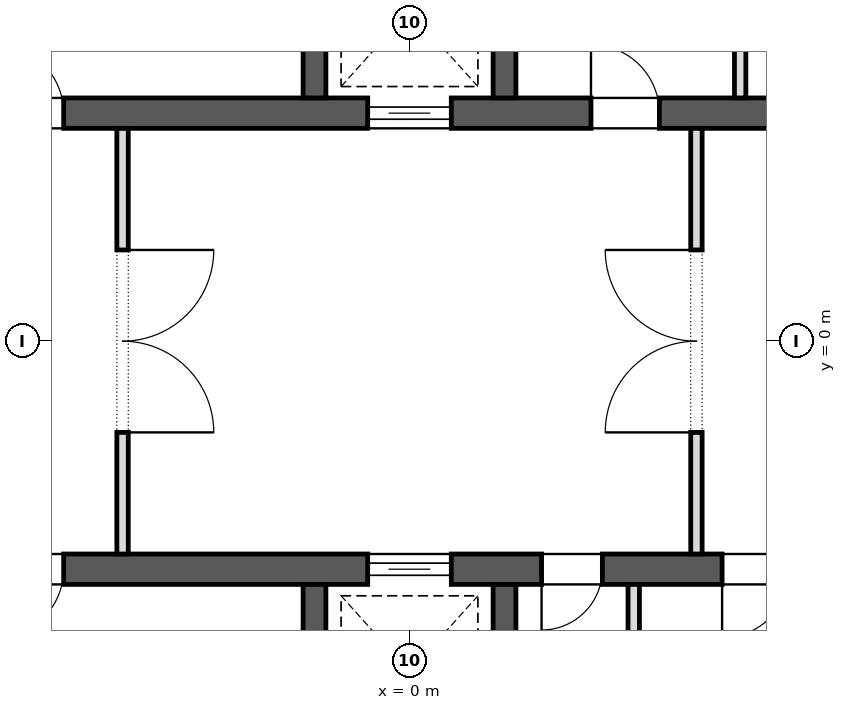
"""IFC4 building model, lengths in metres.
Left out: names, types, materials, properties, quantities, classifications, styles, units other than length and angle.
Written with IfcOpenShell. Run it as: python <this file> out.ifc"""

import sys

from ifc_helpers import new_model, si_unit, direction, frame, frame_2d, origin, place, context, subcontext, project, spatial, rectangle, extrude, element, fill, save


model = new_model("IFC4")
c1 = context("Model", 3, precision=1e-05, world=origin(), true_north=direction((0.0, 1.0)))
c2 = subcontext(c1, "Body", "Model", "MODEL_VIEW")
j1 = project(units=[si_unit("LENGTHUNIT", "METRE"), si_unit("PLANEANGLEUNIT", "RADIAN")], contexts=[c1])
p1 = place(None, origin())
s1 = spatial("IfcSite", under=j1, at=p1, CompositionType="ELEMENT")
p2 = place(p1, origin())
s2 = spatial("IfcBuilding", under=s1, at=p2, CompositionType="ELEMENT")
p3 = place(p2, frame((0.0, 0.0, 343.3)))
s3 = spatial("IfcBuildingStorey", under=s2, at=p3, CompositionType="ELEMENT", Elevation=343.3)
p4 = place(p3, frame((-11.4, 3.0, 0.0), z_axis=(0.0, 0.0, 1.0), x_axis=(1.0, 0.0, 0.0)))
e1 = element("IfcWall", 1, at=p4, inside=s3, PredefinedType="SHEAR", context=c2, shape_type="SweptSolid", body=[
    extrude(rectangle(XDim=22.8, YDim=0.4, at=frame_2d((11.4, 0.0))), origin(), (0.0, 0.0, 1.0), 6.0),
])
p5 = place(p4, frame((10.85, 0.0, 0.0)))
e2 = element("IfcOpeningElement", 2, at=p5, cuts=e1, PredefinedType="OPENING", context=c2, shape_type="SweptSolid", body=[
    extrude(rectangle(XDim=1.1, YDim=2.1, at=frame_2d((0.55, 1.05))), frame((0.0, 0.212, 0.0), z_axis=(0.0, -1.0, 0.0), x_axis=(1.0, 0.0, 0.0)), (0.0, 0.0, 1.0), 0.424),
])
p6 = place(p4, frame((13.788, 0.0, 0.0)))
e3 = element("IfcOpeningElement", 3, at=p6, cuts=e1, PredefinedType="OPENING", context=c2, shape_type="SweptSolid", body=[
    extrude(rectangle(XDim=0.9, YDim=2.1, at=frame_2d((0.45, 1.05))), frame((0.0, 0.212, 0.0), z_axis=(0.0, -1.0, 0.0), x_axis=(1.0, 0.0, 0.0)), (0.0, 0.0, 1.0), 0.424),
])
p7 = place(p4, frame((16.212, 0.0, 0.0)))
e4 = element("IfcOpeningElement", 4, at=p7, cuts=e1, PredefinedType="OPENING", context=c2, shape_type="SweptSolid", body=[
    extrude(rectangle(XDim=0.9, YDim=2.1, at=frame_2d((0.45, 1.05))), frame((0.0, 0.212, 0.0), z_axis=(0.0, -1.0, 0.0), x_axis=(1.0, 0.0, 0.0)), (0.0, 0.0, 1.0), 0.424),
])
p8 = place(p4, frame((5.95, 0.0, 0.0)))
e5 = element("IfcOpeningElement", 5, at=p8, cuts=e1, PredefinedType="OPENING", context=c2, shape_type="SweptSolid", body=[
    extrude(rectangle(XDim=0.9, YDim=2.1, at=frame_2d((0.45, 1.05))), frame((0.0, 0.212, 0.0), z_axis=(0.0, -1.0, 0.0), x_axis=(1.0, 0.0, 0.0)), (0.0, 0.0, 1.0), 0.424),
])
p9 = place(p4, frame((0.637, 0.0, 0.0)))
e6 = element("IfcOpeningElement", 6, at=p9, cuts=e1, PredefinedType="OPENING", context=c2, shape_type="SweptSolid", body=[
    extrude(rectangle(XDim=0.9, YDim=2.1, at=frame_2d((0.45, 1.05))), frame((0.0, 0.212, 0.0), z_axis=(0.0, -1.0, 0.0), x_axis=(1.0, 0.0, 0.0)), (0.0, 0.0, 1.0), 0.424),
])
p10 = place(p4, frame((3.212, 0.0, 0.0)))
e7 = element("IfcOpeningElement", 7, at=p10, cuts=e1, PredefinedType="OPENING", context=c2, shape_type="SweptSolid", body=[
    extrude(rectangle(XDim=0.9, YDim=2.1, at=frame_2d((0.45, 1.05))), frame((0.0, 0.212, 0.0), z_axis=(0.0, -1.0, 0.0), x_axis=(1.0, 0.0, 0.0)), (0.0, 0.0, 1.0), 0.424),
])
for number, where, z_axis, x_axis in (
    (8, (-1.25, 3.2, 0.0), (0.0, 0.0, 1.0), (0.0, 1.0, 0.0)),
    (9, (1.25, 3.2, 0.0), (0.0, 0.0, 1.0), (0.0, 1.0, 0.0)),
):
    element("IfcWall", number, at=place(p3, frame(where, z_axis=z_axis, x_axis=x_axis)), inside=s3, PredefinedType="SHEAR", context=c2, shape_type="SweptSolid", body=[
        extrude(rectangle(XDim=2.9, YDim=0.3, at=frame_2d((1.45, 0.0))), origin(), (0.0, 0.0, 1.0), 6.0),
    ])
p11 = place(p3, frame((-11.4, -3.0, 0.0), z_axis=(0.0, 0.0, 1.0), x_axis=(1.0, 0.0, 0.0)))
e10 = element("IfcWall", 10, at=p11, inside=s3, PredefinedType="SHEAR", context=c2, shape_type="SweptSolid", body=[
    extrude(rectangle(XDim=22.8, YDim=0.4, at=frame_2d((11.4, 0.0))), origin(), (0.0, 0.0, 1.0), 6.0),
])
p12 = place(p11, frame((10.85, 0.0, 0.0)))
e11 = element("IfcOpeningElement", 11, at=p12, cuts=e10, PredefinedType="OPENING", context=c2, shape_type="SweptSolid", body=[
    extrude(rectangle(XDim=1.1, YDim=2.1, at=frame_2d((0.55, 1.05))), frame((0.0, 0.212, 0.0), z_axis=(0.0, -1.0, 0.0), x_axis=(1.0, 0.0, 0.0)), (0.0, 0.0, 1.0), 0.424),
])
p13 = place(p11, frame((13.137, 0.0, 0.0)))
e12 = element("IfcOpeningElement", 12, at=p13, cuts=e10, PredefinedType="OPENING", context=c2, shape_type="SweptSolid", body=[
    extrude(rectangle(XDim=0.8, YDim=2.1, at=frame_2d((0.4, 1.05))), frame((0.0, 0.212, 0.0), z_axis=(0.0, -1.0, 0.0), x_axis=(1.0, 0.0, 0.0)), (0.0, 0.0, 1.0), 0.424),
])
p14 = place(p11, frame((15.512, 0.0, 0.0)))
e13 = element("IfcOpeningElement", 13, at=p14, cuts=e10, PredefinedType="OPENING", context=c2, shape_type="SweptSolid", body=[
    extrude(rectangle(XDim=0.9, YDim=2.1, at=frame_2d((0.45, 1.05))), frame((0.0, 0.212, 0.0), z_axis=(0.0, -1.0, 0.0), x_axis=(1.0, 0.0, 0.0)), (0.0, 0.0, 1.0), 0.424),
])
p15 = place(p11, frame((5.95, 0.0, 0.0)))
e14 = element("IfcOpeningElement", 14, at=p15, cuts=e10, PredefinedType="OPENING", context=c2, shape_type="SweptSolid", body=[
    extrude(rectangle(XDim=0.9, YDim=2.1, at=frame_2d((0.45, 1.05))), frame((0.0, 0.212, 0.0), z_axis=(0.0, -1.0, 0.0), x_axis=(1.0, 0.0, 0.0)), (0.0, 0.0, 1.0), 0.424),
])
p16 = place(p11, frame((1.212, 0.0, 0.0)))
e15 = element("IfcOpeningElement", 15, at=p16, cuts=e10, PredefinedType="OPENING", context=c2, shape_type="SweptSolid", body=[
    extrude(rectangle(XDim=0.9, YDim=2.1, at=frame_2d((0.45, 1.05))), frame((0.0, 0.212, 0.0), z_axis=(0.0, -1.0, 0.0), x_axis=(1.0, 0.0, 0.0)), (0.0, 0.0, 1.0), 0.424),
])
p17 = place(p11, frame((3.788, 0.0, 0.0)))
e16 = element("IfcOpeningElement", 16, at=p17, cuts=e10, PredefinedType="OPENING", context=c2, shape_type="SweptSolid", body=[
    extrude(rectangle(XDim=0.9, YDim=2.1, at=frame_2d((0.45, 1.05))), frame((0.0, 0.212, 0.0), z_axis=(0.0, -1.0, 0.0), x_axis=(1.0, 0.0, 0.0)), (0.0, 0.0, 1.0), 0.424),
])
for number, where, z_axis, x_axis in (
    (17, (-1.25, -6.1, 0.0), (0.0, 0.0, 1.0), (0.0, 1.0, 0.0)),
    (18, (1.25, -6.1, 0.0), (0.0, 0.0, 1.0), (0.0, 1.0, 0.0)),
):
    element("IfcWall", number, at=place(p3, frame(where, z_axis=z_axis, x_axis=x_axis)), inside=s3, PredefinedType="SHEAR", context=c2, shape_type="SweptSolid", body=[
        extrude(rectangle(XDim=2.9, YDim=0.3, at=frame_2d((1.45, 0.0))), origin(), (0.0, 0.0, 1.0), 6.0),
    ])
for number, where, z_axis, x_axis in (
    (19, (4.35, 3.2, 0.0), (0.0, 0.0, 1.0), (0.0, 1.0, 0.0)),
    (20, (2.95, -6.1, 0.0), (0.0, 0.0, 1.0), (0.0, 1.0, 0.0)),
):
    element("IfcWall", number, at=place(p3, frame(where, z_axis=z_axis, x_axis=x_axis)), inside=s3, PredefinedType="PARTITIONING", context=c2, shape_type="SweptSolid", body=[
        extrude(rectangle(XDim=2.9, YDim=0.15, at=frame_2d((1.45, 0.0))), origin(), (0.0, 0.0, 1.0), 5.65),
    ])
p18 = place(p3, frame((-3.775, -2.8, 0.0), z_axis=(0.0, 0.0, 1.0), x_axis=(0.0, 1.0, 0.0)))
e21 = element("IfcWall", 21, at=p18, inside=s3, PredefinedType="PARTITIONING", context=c2, shape_type="SweptSolid", body=[
    extrude(rectangle(XDim=5.6, YDim=0.15, at=frame_2d((2.8, 0.0))), origin(), (0.0, 0.0, 1.0), 5.65),
])
p19 = place(p18, frame((1.6, 0.0, 0.0)))
e22 = element("IfcOpeningElement", 22, at=p19, cuts=e21, PredefinedType="OPENING", context=c2, shape_type="SweptSolid", body=[
    extrude(rectangle(XDim=2.4, YDim=2.1, at=frame_2d((1.2, 1.05))), frame((0.0, 0.087, 0.0), z_axis=(0.0, -1.0, 0.0), x_axis=(1.0, 0.0, 0.0)), (0.0, 0.0, 1.0), 0.174),
])
p20 = place(p3, frame((3.775, -2.8, 0.0), z_axis=(0.0, 0.0, 1.0), x_axis=(0.0, 1.0, 0.0)))
e23 = element("IfcWall", 23, at=p20, inside=s3, PredefinedType="PARTITIONING", context=c2, shape_type="SweptSolid", body=[
    extrude(rectangle(XDim=5.6, YDim=0.15, at=frame_2d((2.8, 0.0))), origin(), (0.0, 0.0, 1.0), 5.65),
])
p21 = place(p20, frame((1.6, 0.0, 0.0)))
e24 = element("IfcOpeningElement", 24, at=p21, cuts=e23, PredefinedType="OPENING", context=c2, shape_type="SweptSolid", body=[
    extrude(rectangle(XDim=2.4, YDim=2.1, at=frame_2d((1.2, 1.05))), frame((0.0, 0.087, 0.0), z_axis=(0.0, -1.0, 0.0), x_axis=(1.0, 0.0, 0.0)), (0.0, 0.0, 1.0), 0.174),
])
p22 = place(p5, origin())
e25 = element("IfcDoor", 25, at=p22, inside=s3, OperationType="SLIDING_TO_LEFT", PredefinedType="DOOR", context=c2, shape_type="SweptSolid", body=[
    extrude(rectangle(XDim=1.1, YDim=2.1, at=frame_2d((0.55, 1.05))), frame((0.0, 0.025, 0.0), z_axis=(0.0, -1.0, 0.0), x_axis=(1.0, 0.0, 0.0)), (0.0, 0.0, 1.0), 0.05),
])
fill(e2, e25)
p23 = place(p12, origin())
e26 = element("IfcDoor", 26, at=p23, inside=s3, OperationType="SLIDING_TO_LEFT", PredefinedType="DOOR", context=c2, shape_type="SweptSolid", body=[
    extrude(rectangle(XDim=1.1, YDim=2.1, at=frame_2d((0.55, 1.05))), frame((0.0, 0.025, 0.0), z_axis=(0.0, -1.0, 0.0), x_axis=(1.0, 0.0, 0.0)), (0.0, 0.0, 1.0), 0.05),
])
fill(e11, e26)
p24 = place(p19, frame((2.4, 0.0, 0.0), z_axis=(0.0, 0.0, 1.0), x_axis=(-1.0, 0.0, 0.0)))
e27 = element("IfcDoor", 27, at=p24, inside=s3, OperationType="DOUBLE_DOOR_SINGLE_SWING", PredefinedType="DOOR", context=c2, shape_type="SweptSolid", body=[
    extrude(rectangle(XDim=2.4, YDim=2.1, at=frame_2d((1.2, 1.05))), frame((0.0, 0.025, 0.0), z_axis=(0.0, -1.0, 0.0), x_axis=(1.0, 0.0, 0.0)), (0.0, 0.0, 1.0), 0.05),
])
fill(e22, e27)
p25 = place(p21, origin())
e28 = element("IfcDoor", 28, at=p25, inside=s3, OperationType="DOUBLE_DOOR_SINGLE_SWING", PredefinedType="DOOR", context=c2, shape_type="SweptSolid", body=[
    extrude(rectangle(XDim=2.4, YDim=2.1, at=frame_2d((1.2, 1.05))), frame((0.0, 0.025, 0.0), z_axis=(0.0, -1.0, 0.0), x_axis=(1.0, 0.0, 0.0)), (0.0, 0.0, 1.0), 0.05),
])
fill(e24, e28)
p26 = place(p6, origin())
e29 = element("IfcDoor", 29, at=p26, inside=s3, OperationType="SINGLE_SWING_RIGHT", PredefinedType="DOOR", context=c2, shape_type="SweptSolid", body=[
    extrude(rectangle(XDim=0.9, YDim=2.1, at=frame_2d((0.45, 1.05))), frame((0.0, 0.025, 0.0), z_axis=(0.0, -1.0, 0.0), x_axis=(1.0, 0.0, 0.0)), (0.0, 0.0, 1.0), 0.05),
])
fill(e3, e29)
p27 = place(p8, origin())
e30 = element("IfcDoor", 30, at=p27, inside=s3, OperationType="SINGLE_SWING_RIGHT", PredefinedType="DOOR", context=c2, shape_type="SweptSolid", body=[
    extrude(rectangle(XDim=0.9, YDim=2.1, at=frame_2d((0.45, 1.05))), frame((0.0, 0.025, 0.0), z_axis=(0.0, -1.0, 0.0), x_axis=(1.0, 0.0, 0.0)), (0.0, 0.0, 1.0), 0.05),
])
fill(e5, e30)
p28 = place(p13, frame((0.8, 0.0, 0.0), z_axis=(0.0, 0.0, 1.0), x_axis=(-1.0, 0.0, 0.0)))
e31 = element("IfcDoor", 31, at=p28, inside=s3, OperationType="SINGLE_SWING_LEFT", PredefinedType="DOOR", context=c2, shape_type="SweptSolid", body=[
    extrude(rectangle(XDim=0.8, YDim=2.1, at=frame_2d((0.4, 1.05))), frame((0.0, 0.025, 0.0), z_axis=(0.0, -1.0, 0.0), x_axis=(1.0, 0.0, 0.0)), (0.0, 0.0, 1.0), 0.05),
])
fill(e12, e31)
p29 = place(p14, frame((0.9, 0.0, 0.0), z_axis=(0.0, 0.0, 1.0), x_axis=(-1.0, 0.0, 0.0)))
e32 = element("IfcDoor", 32, at=p29, inside=s3, OperationType="SINGLE_SWING_LEFT", PredefinedType="DOOR", context=c2, shape_type="SweptSolid", body=[
    extrude(rectangle(XDim=0.9, YDim=2.1, at=frame_2d((0.45, 1.05))), frame((0.0, 0.025, 0.0), z_axis=(0.0, -1.0, 0.0), x_axis=(1.0, 0.0, 0.0)), (0.0, 0.0, 1.0), 0.05),
])
fill(e13, e32)
p30 = place(p15, frame((0.9, 0.0, 0.0), z_axis=(0.0, 0.0, 1.0), x_axis=(-1.0, 0.0, 0.0)))
e33 = element("IfcDoor", 33, at=p30, inside=s3, OperationType="SINGLE_SWING_LEFT", PredefinedType="DOOR", context=c2, shape_type="SweptSolid", body=[
    extrude(rectangle(XDim=0.9, YDim=2.1, at=frame_2d((0.45, 1.05))), frame((0.0, 0.025, 0.0), z_axis=(0.0, -1.0, 0.0), x_axis=(1.0, 0.0, 0.0)), (0.0, 0.0, 1.0), 0.05),
])
fill(e14, e33)
save(model, sys.argv[1])
